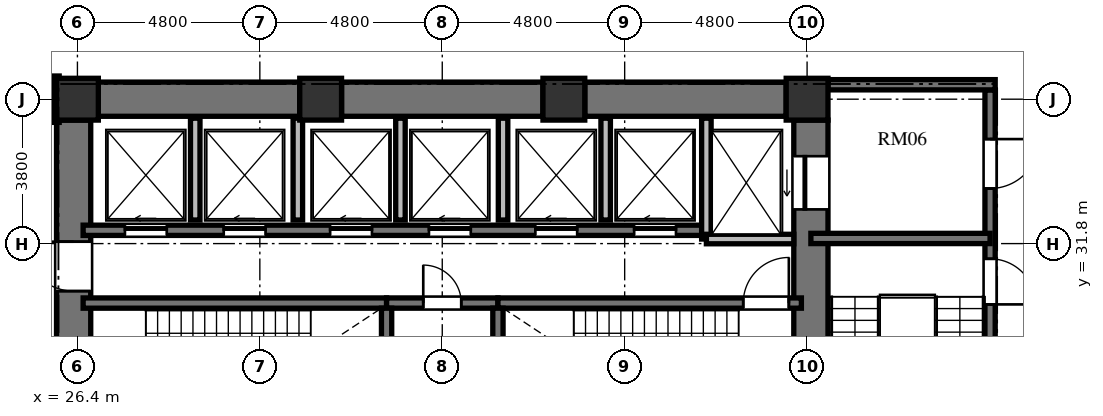
"""IFC4 building model, lengths in metres.
Left out: names, types, materials, properties, quantities, classifications, styles, units other than length and angle.
Written with IfcOpenShell. Run it as: python <this file> out.ifc"""

import sys

from ifc_helpers import new_model, si_unit, direction, frame, frame_2d, origin, origin_2d, place, context, subcontext, project, spatial, rectangle, extrude, element, fill, save


model = new_model("IFC4")
c1 = context("Model", 3, precision=1e-05, world=origin(), true_north=direction((0.0, 1.0)))
c2 = subcontext(c1, "Body", "Model", "MODEL_VIEW")
j1 = project(units=[si_unit("LENGTHUNIT", "METRE"), si_unit("PLANEANGLEUNIT", "RADIAN")], contexts=[c1])
p1 = place(None, origin())
s1 = spatial("IfcSite", under=j1, at=p1, CompositionType="ELEMENT")
p2 = place(p1, origin())
s2 = spatial("IfcBuilding", under=s1, at=p2, CompositionType="ELEMENT")
p3 = place(p2, frame((0.0, 0.0, 15.6)))
s3 = spatial("IfcBuildingStorey", under=s2, at=p3, CompositionType="ELEMENT", Elevation=15.6)
for number, where, z_axis, x_axis in (
    (1, (45.6, 35.6, 0.0), (0.0, 0.0, 1.0), (1.0, 0.0, 0.0)),
    (2, (39.2, 35.6, 0.0), (0.0, 0.0, 1.0), (1.0, 0.0, 0.0)),
    (3, (32.8, 35.6, 0.0), (0.0, 0.0, 1.0), (1.0, 0.0, 0.0)),
    (4, (26.4, 35.6, 0.0), (0.0, 0.0, 1.0), (1.0, 0.0, 0.0)),
):
    element("IfcColumn", number, at=place(p3, frame(where, z_axis=z_axis, x_axis=x_axis)), inside=s3, PredefinedType="COLUMN", context=c2, shape_type="SweptSolid", body=[
        extrude(rectangle(XDim=1.1, YDim=1.1, at=origin_2d()), origin(), (0.0, 0.0, 1.0), 4.8),
    ])
p4 = place(p3, frame((26.3, 20.95, 0.0), z_axis=(0.0, 0.0, 1.0), x_axis=(0.0, 1.0, 0.0)))
e5 = element("IfcWall", 5, at=p4, inside=s3, PredefinedType="SHEAR", context=c2, shape_type="SweptSolid", body=[
    extrude(rectangle(XDim=14.1, YDim=0.9, at=frame_2d((7.05, 0.0))), origin(), (0.0, 0.0, 1.0), 4.8),
])
p5 = place(p4, frame((6.5, 0.0, 0.0)))
e6 = element("IfcOpeningElement", 6, at=p5, cuts=e5, PredefinedType="OPENING", context=c2, shape_type="SweptSolid", body=[
    extrude(rectangle(XDim=1.2, YDim=2.15, at=frame_2d((0.6, 1.075))), frame((0.0, 0.46, 0.0), z_axis=(0.0, -1.0, 0.0), x_axis=(1.0, 0.0, 0.0)), (0.0, 0.0, 1.0), 0.92),
])
p6 = place(p4, frame((9.6, 0.0, 0.0)))
e7 = element("IfcOpeningElement", 7, at=p6, cuts=e5, PredefinedType="OPENING", context=c2, shape_type="SweptSolid", body=[
    extrude(rectangle(XDim=1.3, YDim=2.2, at=frame_2d((0.65, 1.1))), frame((0.0, 0.46, 0.0), z_axis=(0.0, -1.0, 0.0), x_axis=(1.0, 0.0, 0.0)), (0.0, 0.0, 1.0), 0.92),
])
p7 = place(p4, frame((3.26, 0.0, 0.0)))
e8 = element("IfcOpeningElement", 8, at=p7, cuts=e5, PredefinedType="OPENING", context=c2, shape_type="SweptSolid", body=[
    extrude(rectangle(XDim=1.3, YDim=2.2, at=frame_2d((0.65, 1.1))), frame((0.0, 0.46, 0.0), z_axis=(0.0, -1.0, 0.0), x_axis=(1.0, 0.0, 0.0)), (0.0, 0.0, 1.0), 0.92),
])
p8 = place(p3, frame((45.7, 20.95, 0.0), z_axis=(0.0, 0.0, 1.0), x_axis=(0.0, 1.0, 0.0)))
e9 = element("IfcWall", 9, at=p8, inside=s3, PredefinedType="SHEAR", context=c2, shape_type="SweptSolid", body=[
    extrude(rectangle(XDim=14.1, YDim=0.9, at=frame_2d((7.05, 0.0))), origin(), (0.0, 0.0, 1.0), 4.8),
])
p9 = place(p8, frame((11.75, 0.0, 0.0)))
e10 = element("IfcOpeningElement", 10, at=p9, cuts=e9, PredefinedType="OPENING", context=c2, shape_type="SweptSolid", body=[
    extrude(rectangle(XDim=1.4, YDim=2.3, at=frame_2d((0.7, 1.15))), frame((0.0, 0.46, 0.0), z_axis=(0.0, -1.0, 0.0), x_axis=(1.0, 0.0, 0.0)), (0.0, 0.0, 1.0), 0.92),
])
p10 = place(p8, frame((0.95, 0.0, 0.0)))
e11 = element("IfcOpeningElement", 11, at=p10, cuts=e9, PredefinedType="OPENING", context=c2, shape_type="SweptSolid", body=[
    extrude(rectangle(XDim=1.4, YDim=2.3, at=frame_2d((0.7, 1.15))), frame((0.0, 0.46, 0.0), z_axis=(0.0, -1.0, 0.0), x_axis=(1.0, 0.0, 0.0)), (0.0, 0.0, 1.0), 0.92),
])
p11 = place(p3, frame((26.95, 35.6, 0.0), z_axis=(0.0, 0.0, 1.0), x_axis=(1.0, 0.0, 0.0)))
e12 = element("IfcWall", 12, at=p11, inside=s3, PredefinedType="SHEAR", context=c2, shape_type="SweptSolid", body=[
    extrude(rectangle(XDim=5.3, YDim=0.9, at=frame_2d((2.65, 0.0))), origin(), (0.0, 0.0, 1.0), 4.8),
])
p12 = place(p3, frame((33.35, 35.6, 0.0), z_axis=(0.0, 0.0, 1.0), x_axis=(1.0, 0.0, 0.0)))
e13 = element("IfcWall", 13, at=p12, inside=s3, PredefinedType="SHEAR", context=c2, shape_type="SweptSolid", body=[
    extrude(rectangle(XDim=5.3, YDim=0.9, at=frame_2d((2.65, 0.0))), origin(), (0.0, 0.0, 1.0), 4.8),
])
p13 = place(p3, frame((39.75, 35.6, 0.0), z_axis=(0.0, 0.0, 1.0), x_axis=(1.0, 0.0, 0.0)))
e14 = element("IfcWall", 14, at=p13, inside=s3, PredefinedType="SHEAR", context=c2, shape_type="SweptSolid", body=[
    extrude(rectangle(XDim=5.3, YDim=0.9, at=frame_2d((2.65, 0.0))), origin(), (0.0, 0.0, 1.0), 4.8),
])
p14 = place(p3, frame((26.55, 30.235, 0.0), z_axis=(0.0, 0.0, 1.0), x_axis=(1.0, 0.0, 0.0)))
e15 = element("IfcWall", 15, at=p14, inside=s3, PredefinedType="SHEAR", context=c2, shape_type="SweptSolid", body=[
    extrude(rectangle(XDim=7.985, YDim=0.27, at=frame_2d((3.992, 0.0))), origin(), (0.0, 0.0, 1.0), 4.8),
])
p15 = place(p3, frame((34.535, 30.235, 0.0), z_axis=(0.0, 0.0, 1.0), x_axis=(1.0, 0.0, 0.0)))
e16 = element("IfcWall", 16, at=p15, inside=s3, PredefinedType="SHEAR", context=c2, shape_type="SweptSolid", body=[
    extrude(rectangle(XDim=2.93, YDim=0.27, at=frame_2d((1.465, 0.0))), origin(), (0.0, 0.0, 1.0), 4.8),
])
p16 = place(p15, frame((0.965, 0.0, 0.0)))
e17 = element("IfcOpeningElement", 17, at=p16, cuts=e16, PredefinedType="OPENING", context=c2, shape_type="SweptSolid", body=[
    extrude(rectangle(XDim=1.0, YDim=2.1, at=frame_2d((0.5, 1.05))), frame((0.0, 0.145, 0.0), z_axis=(0.0, -1.0, 0.0), x_axis=(1.0, 0.0, 0.0)), (0.0, 0.0, 1.0), 0.29),
])
p17 = place(p3, frame((37.465, 30.235, 0.0), z_axis=(0.0, 0.0, 1.0), x_axis=(1.0, 0.0, 0.0)))
e18 = element("IfcWall", 18, at=p17, inside=s3, PredefinedType="SHEAR", context=c2, shape_type="SweptSolid", body=[
    extrude(rectangle(XDim=7.985, YDim=0.27, at=frame_2d((3.992, 0.0))), origin(), (0.0, 0.0, 1.0), 4.8),
])
p18 = place(p17, frame((6.455, 0.0, 0.0)))
e19 = element("IfcOpeningElement", 19, at=p18, cuts=e18, PredefinedType="OPENING", context=c2, shape_type="SweptSolid", body=[
    extrude(rectangle(XDim=1.2, YDim=2.15, at=frame_2d((0.6, 1.075))), frame((0.0, 0.145, 0.0), z_axis=(0.0, -1.0, 0.0), x_axis=(1.0, 0.0, 0.0)), (0.0, 0.0, 1.0), 0.29),
])
for number, where, z_axis, x_axis in (
    (20, (34.535, 26.02, 0.0), (0.0, 0.0, 1.0), (0.0, 1.0, 0.0)),
    (21, (37.465, 26.02, 0.0), (0.0, 0.0, 1.0), (0.0, 1.0, 0.0)),
):
    element("IfcWall", number, at=place(p3, frame(where, z_axis=z_axis, x_axis=x_axis)), inside=s3, PredefinedType="SHEAR", context=c2, shape_type="SweptSolid", body=[
        extrude(rectangle(XDim=4.08, YDim=0.27, at=frame_2d((2.04, 0.0))), origin(), (0.0, 0.0, 1.0), 4.8),
    ])
p19 = place(p3, frame((26.55, 32.15, 0.0), z_axis=(0.0, 0.0, 1.0), x_axis=(1.0, 0.0, 0.0)))
e22 = element("IfcWall", 22, at=p19, inside=s3, PredefinedType="SHEAR", context=c2, shape_type="SweptSolid", body=[
    extrude(rectangle(XDim=16.4, YDim=0.27, at=frame_2d((8.2, 0.0))), origin(), (0.0, 0.0, 1.0), 4.8),
])
p20 = place(p19, frame((1.1, 0.0, 0.0)))
e23 = element("IfcOpeningElement", 23, at=p20, cuts=e22, PredefinedType="OPENING", context=c2, shape_type="SweptSolid", body=[
    extrude(rectangle(XDim=1.1, YDim=2.2, at=frame_2d((0.55, 1.1))), frame((0.0, 0.145, 0.0), z_axis=(0.0, -1.0, 0.0), x_axis=(1.0, 0.0, 0.0)), (0.0, 0.0, 1.0), 0.29),
])
p21 = place(p19, frame((3.7, 0.0, 0.0)))
e24 = element("IfcOpeningElement", 24, at=p21, cuts=e22, PredefinedType="OPENING", context=c2, shape_type="SweptSolid", body=[
    extrude(rectangle(XDim=1.1, YDim=2.2, at=frame_2d((0.55, 1.1))), frame((0.0, 0.145, 0.0), z_axis=(0.0, -1.0, 0.0), x_axis=(1.0, 0.0, 0.0)), (0.0, 0.0, 1.0), 0.29),
])
p22 = place(p19, frame((6.5, 0.0, 0.0)))
e25 = element("IfcOpeningElement", 25, at=p22, cuts=e22, PredefinedType="OPENING", context=c2, shape_type="SweptSolid", body=[
    extrude(rectangle(XDim=1.1, YDim=2.2, at=frame_2d((0.55, 1.1))), frame((0.0, 0.145, 0.0), z_axis=(0.0, -1.0, 0.0), x_axis=(1.0, 0.0, 0.0)), (0.0, 0.0, 1.0), 0.29),
])
p23 = place(p19, frame((9.1, 0.0, 0.0)))
e26 = element("IfcOpeningElement", 26, at=p23, cuts=e22, PredefinedType="OPENING", context=c2, shape_type="SweptSolid", body=[
    extrude(rectangle(XDim=1.1, YDim=2.2, at=frame_2d((0.55, 1.1))), frame((0.0, 0.145, 0.0), z_axis=(0.0, -1.0, 0.0), x_axis=(1.0, 0.0, 0.0)), (0.0, 0.0, 1.0), 0.29),
])
p24 = place(p19, frame((11.9, 0.0, 0.0)))
e27 = element("IfcOpeningElement", 27, at=p24, cuts=e22, PredefinedType="OPENING", context=c2, shape_type="SweptSolid", body=[
    extrude(rectangle(XDim=1.1, YDim=2.2, at=frame_2d((0.55, 1.1))), frame((0.0, 0.145, 0.0), z_axis=(0.0, -1.0, 0.0), x_axis=(1.0, 0.0, 0.0)), (0.0, 0.0, 1.0), 0.29),
])
p25 = place(p19, frame((14.5, 0.0, 0.0)))
e28 = element("IfcOpeningElement", 28, at=p25, cuts=e22, PredefinedType="OPENING", context=c2, shape_type="SweptSolid", body=[
    extrude(rectangle(XDim=1.1, YDim=2.2, at=frame_2d((0.55, 1.1))), frame((0.0, 0.145, 0.0), z_axis=(0.0, -1.0, 0.0), x_axis=(1.0, 0.0, 0.0)), (0.0, 0.0, 1.0), 0.29),
])
p26 = place(p3, frame((42.95, 31.92, 0.0), z_axis=(0.0, 0.0, 1.0), x_axis=(0.0, 1.0, 0.0)))
e29 = element("IfcWall", 29, at=p26, inside=s3, PredefinedType="SOLIDWALL", context=c2, shape_type="SweptSolid", body=[
    extrude(rectangle(XDim=3.18, YDim=0.25, at=frame_2d((1.59, 0.0))), origin(), (0.0, 0.0, 1.0), 4.52),
])
p27 = place(p3, frame((42.95, 31.92, 0.0), z_axis=(0.0, 0.0, 1.0), x_axis=(1.0, 0.0, 0.0)))
e30 = element("IfcWall", 30, at=p27, inside=s3, PredefinedType="SOLIDWALL", context=c2, shape_type="SweptSolid", body=[
    extrude(rectangle(XDim=2.3, YDim=0.25, at=frame_2d((1.15, 0.0))), origin(), (0.0, 0.0, 1.0), 4.52),
])
for number, where, z_axis, x_axis in (
    (31, (29.5, 32.42, 0.0), (0.0, 0.0, 1.0), (0.0, 1.0, 0.0)),
    (32, (32.2, 32.42, 0.0), (0.0, 0.0, 1.0), (0.0, 1.0, 0.0)),
    (33, (34.9, 32.42, 0.0), (0.0, 0.0, 1.0), (0.0, 1.0, 0.0)),
    (34, (37.6, 32.42, 0.0), (0.0, 0.0, 1.0), (0.0, 1.0, 0.0)),
    (35, (40.3, 32.42, 0.0), (0.0, 0.0, 1.0), (0.0, 1.0, 0.0)),
):
    element("IfcWall", number, at=place(p3, frame(where, z_axis=z_axis, x_axis=x_axis)), inside=s3, PredefinedType="SOLIDWALL", context=c2, shape_type="SweptSolid", body=[
        extrude(rectangle(XDim=2.68, YDim=0.25, at=frame_2d((1.34, 0.0))), origin(), (0.0, 0.0, 1.0), 4.52),
    ])
p28 = place(p3, frame((50.415, 35.845, 0.0), z_axis=(0.0, 0.0, 1.0), x_axis=(0.0, -1.0, 0.0)))
e36 = element("IfcWall", 36, at=p28, inside=s3, PredefinedType="SHEAR", context=c2, shape_type="SweptSolid", body=[
    extrude(rectangle(XDim=15.825, YDim=0.27, at=frame_2d((7.913, 0.0))), origin(), (0.0, 0.0, 1.0), 4.8),
])
p29 = place(p28, frame((4.445, 0.0, 0.0)))
e37 = element("IfcOpeningElement", 37, at=p29, cuts=e36, PredefinedType="OPENING", context=c2, shape_type="SweptSolid", body=[
    extrude(rectangle(XDim=1.2, YDim=2.15, at=frame_2d((0.6, 1.075))), frame((0.0, 0.145, 0.0), z_axis=(0.0, -1.0, 0.0), x_axis=(1.0, 0.0, 0.0)), (0.0, 0.0, 1.0), 0.29),
])
p30 = place(p28, frame((1.295, 0.0, 0.0)))
e38 = element("IfcOpeningElement", 38, at=p30, cuts=e36, PredefinedType="OPENING", context=c2, shape_type="SweptSolid", body=[
    extrude(rectangle(XDim=1.3, YDim=2.2, at=frame_2d((0.65, 1.1))), frame((0.0, 0.145, 0.0), z_axis=(0.0, -1.0, 0.0), x_axis=(1.0, 0.0, 0.0)), (0.0, 0.0, 1.0), 0.29),
])
p31 = place(p28, frame((13.095, 0.0, 0.0)))
e39 = element("IfcOpeningElement", 39, at=p31, cuts=e36, PredefinedType="OPENING", context=c2, shape_type="SweptSolid", body=[
    extrude(rectangle(XDim=1.3, YDim=2.2, at=frame_2d((0.65, 1.1))), frame((0.0, 0.145, 0.0), z_axis=(0.0, -1.0, 0.0), x_axis=(1.0, 0.0, 0.0)), (0.0, 0.0, 1.0), 0.29),
])
p32 = place(p3, frame((46.15, 35.98, 0.0), z_axis=(0.0, 0.0, 1.0), x_axis=(1.0, 0.0, 0.0)))
e40 = element("IfcWall", 40, at=p32, inside=s3, PredefinedType="SHEAR", context=c2, shape_type="SweptSolid", body=[
    extrude(rectangle(XDim=4.4, YDim=0.27, at=frame_2d((2.2, 0.0))), origin(), (0.0, 0.0, 1.0), 4.8),
])
p33 = place(p3, frame((45.7, 31.935, 0.0), z_axis=(0.0, 0.0, 1.0), x_axis=(1.0, 0.0, 0.0)))
e41 = element("IfcWall", 41, at=p33, inside=s3, PredefinedType="SHEAR", context=c2, shape_type="SweptSolid", body=[
    extrude(rectangle(XDim=4.715, YDim=0.27, at=frame_2d((2.357, 0.0))), origin(), (0.0, 0.0, 1.0), 4.8),
])
p34 = place(p3, frame((25.83, 36.21, 0.0), z_axis=(0.0, 0.0, 1.0), x_axis=(0.0, -1.0, 0.0)))
e42 = element("IfcWall", 42, at=p34, inside=s3, PredefinedType="PARTITIONING", context=c2, shape_type="SweptSolid", body=[
    extrude(rectangle(XDim=1.22, YDim=0.18, at=frame_2d((0.61, 0.0))), origin(), (0.0, 0.0, 1.0), 4.52),
])
p35 = place(p18, origin())
e43 = element("IfcDoor", 43, at=p35, inside=s3, OperationType="SINGLE_SWING_RIGHT", PredefinedType="DOOR", context=c2, shape_type="SweptSolid", body=[
    extrude(rectangle(XDim=1.2, YDim=2.15, at=frame_2d((0.6, 1.075))), frame((0.0, 0.025, 0.0), z_axis=(0.0, -1.0, 0.0), x_axis=(1.0, 0.0, 0.0)), (0.0, 0.0, 1.0), 0.05),
])
fill(e19, e43)
p36 = place(p16, origin())
e44 = element("IfcDoor", 44, at=p36, inside=s3, OperationType="SINGLE_SWING_LEFT", PredefinedType="DOOR", context=c2, shape_type="SweptSolid", body=[
    extrude(rectangle(XDim=1.0, YDim=2.1, at=frame_2d((0.5, 1.05))), frame((0.0, 0.025, 0.0), z_axis=(0.0, -1.0, 0.0), x_axis=(1.0, 0.0, 0.0)), (0.0, 0.0, 1.0), 0.05),
])
fill(e17, e44)
p37 = place(p6, origin())
e45 = element("IfcDoor", 45, at=p37, inside=s3, OperationType="SINGLE_SWING_RIGHT", PredefinedType="DOOR", context=c2, shape_type="SweptSolid", body=[
    extrude(rectangle(XDim=1.3, YDim=2.2, at=frame_2d((0.65, 1.1))), frame((0.0, 0.025, 0.0), z_axis=(0.0, -1.0, 0.0), x_axis=(1.0, 0.0, 0.0)), (0.0, 0.0, 1.0), 0.05),
])
fill(e7, e45)
p38 = place(p20, origin())
e46 = element("IfcDoor", 46, at=p38, inside=s3, OperationType="SLIDING_TO_LEFT", PredefinedType="DOOR", context=c2, shape_type="SweptSolid", body=[
    extrude(rectangle(XDim=1.1, YDim=2.2, at=frame_2d((0.55, 1.1))), frame((0.0, 0.025, 0.0), z_axis=(0.0, -1.0, 0.0), x_axis=(1.0, 0.0, 0.0)), (0.0, 0.0, 1.0), 0.05),
])
fill(e23, e46)
p39 = place(p21, origin())
e47 = element("IfcDoor", 47, at=p39, inside=s3, OperationType="SLIDING_TO_LEFT", PredefinedType="DOOR", context=c2, shape_type="SweptSolid", body=[
    extrude(rectangle(XDim=1.1, YDim=2.2, at=frame_2d((0.55, 1.1))), frame((0.0, 0.025, 0.0), z_axis=(0.0, -1.0, 0.0), x_axis=(1.0, 0.0, 0.0)), (0.0, 0.0, 1.0), 0.05),
])
fill(e24, e47)
p40 = place(p22, origin())
e48 = element("IfcDoor", 48, at=p40, inside=s3, OperationType="SLIDING_TO_LEFT", PredefinedType="DOOR", context=c2, shape_type="SweptSolid", body=[
    extrude(rectangle(XDim=1.1, YDim=2.2, at=frame_2d((0.55, 1.1))), frame((0.0, 0.025, 0.0), z_axis=(0.0, -1.0, 0.0), x_axis=(1.0, 0.0, 0.0)), (0.0, 0.0, 1.0), 0.05),
])
fill(e25, e48)
p41 = place(p23, origin())
e49 = element("IfcDoor", 49, at=p41, inside=s3, OperationType="SLIDING_TO_LEFT", PredefinedType="DOOR", context=c2, shape_type="SweptSolid", body=[
    extrude(rectangle(XDim=1.1, YDim=2.2, at=frame_2d((0.55, 1.1))), frame((0.0, 0.025, 0.0), z_axis=(0.0, -1.0, 0.0), x_axis=(1.0, 0.0, 0.0)), (0.0, 0.0, 1.0), 0.05),
])
fill(e26, e49)
p42 = place(p24, origin())
e50 = element("IfcDoor", 50, at=p42, inside=s3, OperationType="SLIDING_TO_LEFT", PredefinedType="DOOR", context=c2, shape_type="SweptSolid", body=[
    extrude(rectangle(XDim=1.1, YDim=2.2, at=frame_2d((0.55, 1.1))), frame((0.0, 0.025, 0.0), z_axis=(0.0, -1.0, 0.0), x_axis=(1.0, 0.0, 0.0)), (0.0, 0.0, 1.0), 0.05),
])
fill(e27, e50)
p43 = place(p25, origin())
e51 = element("IfcDoor", 51, at=p43, inside=s3, OperationType="SLIDING_TO_LEFT", PredefinedType="DOOR", context=c2, shape_type="SweptSolid", body=[
    extrude(rectangle(XDim=1.1, YDim=2.2, at=frame_2d((0.55, 1.1))), frame((0.0, 0.025, 0.0), z_axis=(0.0, -1.0, 0.0), x_axis=(1.0, 0.0, 0.0)), (0.0, 0.0, 1.0), 0.05),
])
fill(e28, e51)
p44 = place(p9, origin())
e52 = element("IfcDoor", 52, at=p44, inside=s3, OperationType="SLIDING_TO_LEFT", PredefinedType="DOOR", context=c2, shape_type="SweptSolid", body=[
    extrude(rectangle(XDim=1.4, YDim=2.3, at=frame_2d((0.7, 1.15))), frame((0.0, 0.025, 0.0), z_axis=(0.0, -1.0, 0.0), x_axis=(1.0, 0.0, 0.0)), (0.0, 0.0, 1.0), 0.05),
])
fill(e10, e52)
p45 = place(p29, origin())
e53 = element("IfcDoor", 53, at=p45, inside=s3, OperationType="SINGLE_SWING_RIGHT", PredefinedType="DOOR", context=c2, shape_type="SweptSolid", body=[
    extrude(rectangle(XDim=1.2, YDim=2.15, at=frame_2d((0.6, 1.075))), frame((0.0, 0.025, 0.0), z_axis=(0.0, -1.0, 0.0), x_axis=(1.0, 0.0, 0.0)), (0.0, 0.0, 1.0), 0.05),
])
fill(e37, e53)
p46 = place(p30, origin())
e54 = element("IfcDoor", 54, at=p46, inside=s3, OperationType="SINGLE_SWING_LEFT", PredefinedType="DOOR", context=c2, shape_type="SweptSolid", body=[
    extrude(rectangle(XDim=1.3, YDim=2.2, at=frame_2d((0.65, 1.1))), frame((0.0, 0.025, 0.0), z_axis=(0.0, -1.0, 0.0), x_axis=(1.0, 0.0, 0.0)), (0.0, 0.0, 1.0), 0.05),
])
fill(e38, e54)
save(model, sys.argv[1])
